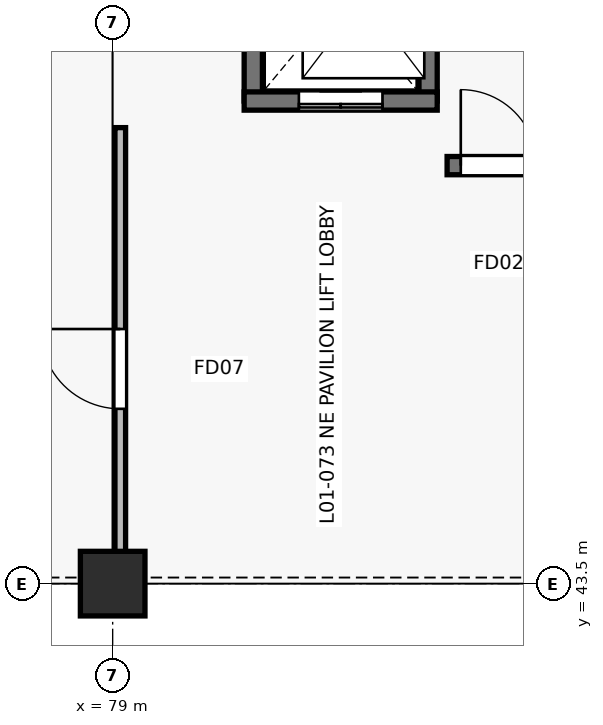
"""IFC4 building model, lengths in metres.
Left out: names, types, materials, properties, quantities, classifications, styles, units other than length and angle.
Written with IfcOpenShell. Run it as: python <this file> out.ifc"""

import sys

from ifc_helpers import new_model, si_unit, direction, frame, frame_2d, origin, origin_2d, place, context, subcontext, project, spatial, rectangle, extrude, element, fill, save


model = new_model("IFC4")
c1 = context("Model", 3, precision=1e-05, world=origin(), true_north=direction((0.0, 1.0)))
c2 = subcontext(c1, "Body", "Model", "MODEL_VIEW")
j1 = project(units=[si_unit("LENGTHUNIT", "METRE"), si_unit("PLANEANGLEUNIT", "RADIAN")], contexts=[c1])
p1 = place(None, origin())
s1 = spatial("IfcSite", under=j1, at=p1, CompositionType="ELEMENT")
p2 = place(p1, origin())
s2 = spatial("IfcBuilding", under=s1, at=p2, CompositionType="ELEMENT")
p3 = place(p2, frame((0.0, 0.0, 4.8)))
s3 = spatial("IfcBuildingStorey", under=s2, at=p3, CompositionType="ELEMENT", Elevation=4.8)
p4 = place(p3, frame((79.0, 43.5, 0.0), z_axis=(0.0, 0.0, 1.0), x_axis=(1.0, 0.0, 0.0)))
e1 = element("IfcColumn", 1, at=p4, inside=s3, PredefinedType="COLUMN", context=c2, shape_type="SweptSolid", body=[
    extrude(rectangle(XDim=0.85, YDim=0.85, at=origin_2d()), origin(), (0.0, 0.0, 1.0), 4.2),
])
for number, where, z_axis, x_axis in (
    (2, (80.85, 49.85, 0.0), (0.0, 0.0, 1.0), (0.0, 1.0, 0.0)),
    (3, (83.15, 52.55, 0.0), (0.0, 0.0, 1.0), (0.0, -1.0, 0.0)),
):
    element("IfcWall", number, at=place(p3, frame(where, z_axis=z_axis, x_axis=x_axis)), inside=s3, PredefinedType="SHEAR", context=c2, shape_type="SweptSolid", body=[
        extrude(rectangle(XDim=2.7, YDim=0.24, at=frame_2d((1.35, 0.0))), origin(), (0.0, 0.0, 1.0), 4.2),
    ])
p5 = place(p3, frame((83.27, 49.85, 0.0), z_axis=(0.0, 0.0, 1.0), x_axis=(-1.0, 0.0, 0.0)))
e4 = element("IfcWall", 4, at=p5, inside=s3, PredefinedType="SHEAR", context=c2, shape_type="SweptSolid", body=[
    extrude(rectangle(XDim=2.54, YDim=0.24, at=frame_2d((1.27, 0.0))), origin(), (0.0, 0.0, 1.0), 4.2),
])
p6 = place(p5, frame((0.72, 0.0, 0.0)))
e5 = element("IfcOpeningElement", 5, at=p6, cuts=e4, PredefinedType="OPENING", context=c2, shape_type="SweptSolid", body=[
    extrude(rectangle(XDim=1.1, YDim=2.15, at=frame_2d((0.55, 1.075))), frame((0.0, 0.13, 0.0), z_axis=(0.0, -1.0, 0.0), x_axis=(1.0, 0.0, 0.0)), (0.0, 0.0, 1.0), 0.26),
])
p7 = place(p3, frame((83.4, 49.0, 0.0), z_axis=(0.0, 0.0, 1.0), x_axis=(1.0, 0.0, 0.0)))
e6 = element("IfcWall", 6, at=p7, inside=s3, PredefinedType="SHEAR", context=c2, shape_type="SweptSolid", body=[
    extrude(rectangle(XDim=7.15, YDim=0.24, at=frame_2d((3.575, 0.0))), origin(), (0.0, 0.0, 1.0), 4.2),
])
p8 = place(p7, frame((0.18, 0.0, 0.0)))
e7 = element("IfcOpeningElement", 7, at=p8, cuts=e6, PredefinedType="OPENING", context=c2, shape_type="SweptSolid", body=[
    extrude(rectangle(XDim=1.0, YDim=2.15, at=frame_2d((0.5, 1.075))), frame((0.0, 0.13, 0.0), z_axis=(0.0, -1.0, 0.0), x_axis=(1.0, 0.0, 0.0)), (0.0, 0.0, 1.0), 0.26),
])
p9 = place(p3, frame((79.1, 43.6, 0.0), z_axis=(0.0, 0.0, 1.0), x_axis=(0.0, 1.0, 0.0)))
e8 = element("IfcWall", 8, at=p9, inside=s3, PredefinedType="PARTITIONING", context=c2, shape_type="SweptSolid", body=[
    extrude(rectangle(XDim=5.9, YDim=0.14, at=frame_2d((2.95, 0.0))), origin(), (0.0, 0.0, 1.0), 2.475),
])
p10 = place(p9, frame((2.2, 0.0, 0.0)))
e9 = element("IfcOpeningElement", 9, at=p10, cuts=e8, PredefinedType="OPENING", context=c2, shape_type="SweptSolid", body=[
    extrude(rectangle(XDim=1.05, YDim=2.1, at=frame_2d((0.525, 1.05))), frame((0.0, 0.08, 0.0), z_axis=(0.0, -1.0, 0.0), x_axis=(1.0, 0.0, 0.0)), (0.0, 0.0, 1.0), 0.16),
])
p11 = place(p6, origin())
e10 = element("IfcDoor", 10, at=p11, inside=s3, OperationType="DOUBLE_DOOR_SLIDING", PredefinedType="USERDEFINED", context=c2, shape_type="SweptSolid", body=[
    extrude(rectangle(XDim=1.1, YDim=2.15, at=frame_2d((0.55, 1.075))), frame((0.0, 0.025, 0.0), z_axis=(0.0, -1.0, 0.0), x_axis=(1.0, 0.0, 0.0)), (0.0, 0.0, 1.0), 0.05),
])
fill(e5, e10)
p12 = place(p8, origin())
e11 = element("IfcDoor", 11, at=p12, inside=s3, OperationType="SINGLE_SWING_LEFT", PredefinedType="DOOR", context=c2, shape_type="SweptSolid", body=[
    extrude(rectangle(XDim=1.0, YDim=2.15, at=frame_2d((0.5, 1.075))), frame((0.0, 0.025, 0.0), z_axis=(0.0, -1.0, 0.0), x_axis=(1.0, 0.0, 0.0)), (0.0, 0.0, 1.0), 0.05),
])
fill(e7, e11)
p13 = place(p10, origin())
e12 = element("IfcDoor", 12, at=p13, inside=s3, OperationType="SINGLE_SWING_RIGHT", PredefinedType="DOOR", context=c2, shape_type="SweptSolid", body=[
    extrude(rectangle(XDim=1.05, YDim=2.1, at=frame_2d((0.525, 1.05))), frame((0.0, 0.025, 0.0), z_axis=(0.0, -1.0, 0.0), x_axis=(1.0, 0.0, 0.0)), (0.0, 0.0, 1.0), 0.05),
])
fill(e9, e12)
save(model, sys.argv[1])
